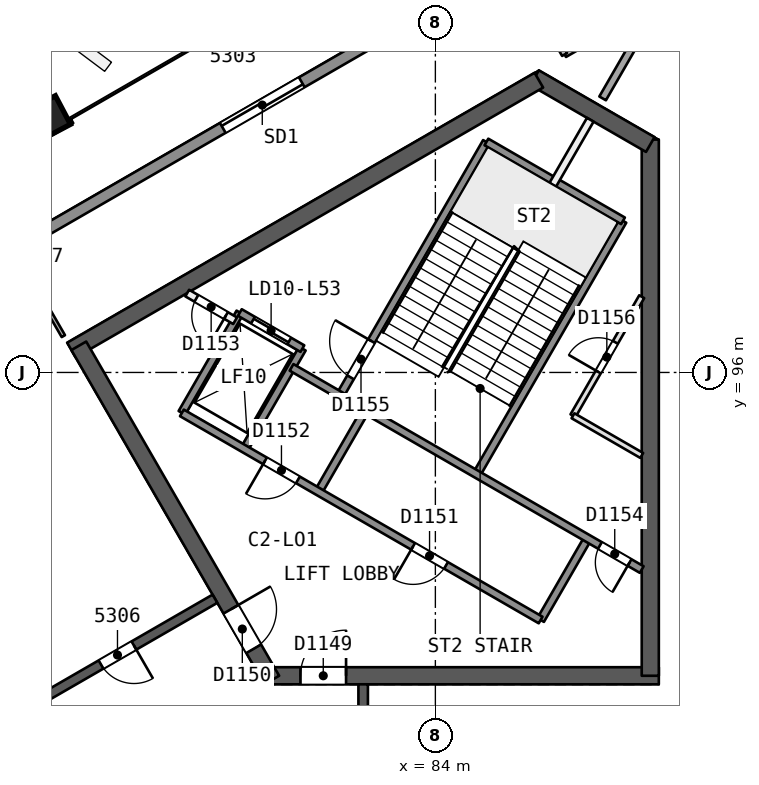
"""IFC4 building model, lengths in metres.
Left out: names, types, materials, properties, quantities, classifications, styles, units other than length and angle.
Written with IfcOpenShell. Run it as: python <this file> out.ifc"""

import sys

from ifc_helpers import new_model, si_unit, direction, frame, frame_2d, origin, origin_2d, place, context, subcontext, project, spatial, rectangle, extrude, element, fill, save


model = new_model("IFC4")
c1 = context("Model", 3, precision=1e-05, world=origin(), true_north=direction((0.0, 1.0)))
c2 = subcontext(c1, "Body", "Model", "MODEL_VIEW")
j1 = project(units=[si_unit("LENGTHUNIT", "METRE"), si_unit("PLANEANGLEUNIT", "RADIAN")], contexts=[c1])
p1 = place(None, origin())
s1 = spatial("IfcSite", under=j1, at=p1, CompositionType="ELEMENT")
p2 = place(p1, origin())
s2 = spatial("IfcBuilding", under=s1, at=p2, CompositionType="ELEMENT")
p3 = place(p2, frame((0.0, 0.0, 216.9)))
s3 = spatial("IfcBuildingStorey", under=s2, at=p3, CompositionType="ELEMENT", Elevation=216.9)
p4 = place(p3, frame((79.63, 88.019, 0.0), z_axis=(0.0, 0.0, 1.0), x_axis=(1.0, 0.0, 0.0)))
e1 = element("IfcWall", 1, at=p4, inside=s3, PredefinedType="SHEAR", context=c2, shape_type="SweptSolid", body=[
    extrude(rectangle(XDim=10.25, YDim=0.45, at=frame_2d((5.125, 0.0))), origin(), (0.0, 0.0, 1.0), 3.7),
])
p5 = place(p4, frame((0.82, 0.0, 0.0)))
e2 = element("IfcOpeningElement", 2, at=p5, cuts=e1, PredefinedType="OPENING", context=c2, shape_type="SweptSolid", body=[
    extrude(rectangle(XDim=1.2, YDim=2.1, at=frame_2d((0.6, 1.05))), frame((0.0, 0.235, 0.0), z_axis=(0.0, -1.0, 0.0), x_axis=(1.0, 0.0, 0.0)), (0.0, 0.0, 1.0), 0.471),
])
p6 = place(p3, frame((89.655, 88.019, 0.0), z_axis=(0.0, 0.0, 1.0), x_axis=(0.0, 1.0, 0.0)))
e3 = element("IfcWall", 3, at=p6, inside=s3, PredefinedType="SHEAR", context=c2, shape_type="SweptSolid", body=[
    extrude(rectangle(XDim=14.108, YDim=0.45, at=frame_2d((7.054, 0.0))), origin(), (0.0, 0.0, 1.0), 3.7),
])
p7 = place(p3, frame((89.655, 101.998, 0.0), z_axis=(0.0, 0.0, 1.0), x_axis=(-0.866042179588, 0.49997094233, 0.0)))
e4 = element("IfcWall", 4, at=p7, inside=s3, PredefinedType="SHEAR", context=c2, shape_type="SweptSolid", body=[
    extrude(rectangle(XDim=3.515, YDim=0.45, at=frame_2d((1.758, 0.0))), origin(), (0.0, 0.0, 1.0), 3.7),
])
p8 = place(p3, frame((86.723, 103.69, 0.0), z_axis=(0.0, 0.0, 1.0), x_axis=(-0.866022713978, -0.500004658852, 0.0)))
e5 = element("IfcWall", 5, at=p8, inside=s3, PredefinedType="SHEAR", context=c2, shape_type="SweptSolid", body=[
    extrude(rectangle(XDim=14.203, YDim=0.45, at=frame_2d((7.102, 0.0))), origin(), (0.0, 0.0, 1.0), 3.7),
])
p9 = place(p3, frame((74.617, 96.701, 0.0), z_axis=(0.0, 0.0, 1.0), x_axis=(0.499994385119, -0.866028645513, 0.0)))
e6 = element("IfcWall", 6, at=p9, inside=s3, PredefinedType="SHEAR", context=c2, shape_type="SweptSolid", body=[
    extrude(rectangle(XDim=10.155, YDim=0.45, at=frame_2d((5.077, 0.0))), origin(), (0.0, 0.0, 1.0), 3.7),
])
p10 = place(p9, frame((8.005, 0.0, 0.0)))
e7 = element("IfcOpeningElement", 7, at=p10, cuts=e6, PredefinedType="OPENING", context=c2, shape_type="SweptSolid", body=[
    extrude(rectangle(XDim=1.2, YDim=2.1, at=frame_2d((0.6, 1.05))), frame((0.0, 0.235, 0.0), z_axis=(0.0, -1.0, 0.0), x_axis=(1.0, 0.0, 0.0)), (0.0, 0.0, 1.0), 0.471),
])
p11 = place(p3, frame((82.1, 72.206, 0.0), z_axis=(0.0, 0.0, 1.0), x_axis=(0.0, 1.0, 0.0)))
e8 = element("IfcWall", 8, at=p11, inside=s3, PredefinedType="SHEAR", context=c2, shape_type="SweptSolid", body=[
    extrude(rectangle(XDim=15.588, YDim=0.25, at=frame_2d((7.794, 0.0))), origin(), (0.0, 0.0, 1.0), 3.3),
])
p12 = place(p11, frame((2.618, 0.0, 0.0)))
e9 = element("IfcOpeningElement", 9, at=p12, cuts=e8, PredefinedType="OPENING", context=c2, shape_type="SweptSolid", body=[
    extrude(rectangle(XDim=1.0, YDim=2.1, at=frame_2d((0.5, 1.05))), frame((0.0, 0.135, 0.0), z_axis=(0.0, -1.0, 0.0), x_axis=(1.0, 0.0, 0.0)), (0.0, 0.0, 1.0), 0.271),
])
p13 = place(p11, frame((7.974, 0.0, 0.0)))
e10 = element("IfcOpeningElement", 10, at=p13, cuts=e8, PredefinedType="OPENING", context=c2, shape_type="SweptSolid", body=[
    extrude(rectangle(XDim=1.2, YDim=2.4, at=frame_2d((0.6, 1.2))), frame((0.0, 0.135, 0.0), z_axis=(0.0, -1.0, 0.0), x_axis=(1.0, 0.0, 0.0)), (0.0, 0.0, 1.0), 0.271),
])
p14 = place(p11, frame((12.65, 0.0, 0.0)))
e11 = element("IfcOpeningElement", 11, at=p14, cuts=e8, PredefinedType="OPENING", context=c2, shape_type="SweptSolid", body=[
    extrude(rectangle(XDim=1.2, YDim=2.4, at=frame_2d((0.6, 1.2))), frame((0.0, 0.135, 0.0), z_axis=(0.0, -1.0, 0.0), x_axis=(1.0, 0.0, 0.0)), (0.0, 0.0, 1.0), 0.271),
])
p15 = place(p3, frame((78.2, 90.046, 0.0), z_axis=(0.0, 0.0, 1.0), x_axis=(-0.866026492143, -0.499998114903, 0.0)))
e12 = element("IfcWall", 12, at=p15, inside=s3, PredefinedType="SHEAR", context=c2, shape_type="SweptSolid", body=[
    extrude(rectangle(XDim=15.588, YDim=0.25, at=frame_2d((7.794, 0.0))), origin(), (0.0, 0.0, 1.0), 3.3),
])
p16 = place(p15, frame((2.462, 0.0, 0.0)))
e13 = element("IfcOpeningElement", 13, at=p16, cuts=e12, PredefinedType="OPENING", context=c2, shape_type="SweptSolid", body=[
    extrude(rectangle(XDim=1.0, YDim=2.1, at=frame_2d((0.5, 1.05))), frame((0.0, 0.135, 0.0), z_axis=(0.0, -1.0, 0.0), x_axis=(1.0, 0.0, 0.0)), (0.0, 0.0, 1.0), 0.271),
])
p17 = place(p15, frame((8.003, 0.0, 0.0)))
e14 = element("IfcOpeningElement", 14, at=p17, cuts=e12, PredefinedType="OPENING", context=c2, shape_type="SweptSolid", body=[
    extrude(rectangle(XDim=1.1, YDim=2.1, at=frame_2d((0.55, 1.05))), frame((0.0, 0.135, 0.0), z_axis=(0.0, -1.0, 0.0), x_axis=(1.0, 0.0, 0.0)), (0.0, 0.0, 1.0), 0.271),
])
p18 = place(p15, frame((11.971, 0.0, 0.0)))
e15 = element("IfcOpeningElement", 15, at=p18, cuts=e12, PredefinedType="OPENING", context=c2, shape_type="SweptSolid", body=[
    extrude(rectangle(XDim=1.0, YDim=2.1, at=frame_2d((0.5, 1.05))), frame((0.0, 0.135, 0.0), z_axis=(0.0, -1.0, 0.0), x_axis=(1.0, 0.0, 0.0)), (0.0, 0.0, 1.0), 0.271),
])
p19 = place(p3, frame((73.822, 102.734, 0.0), z_axis=(0.000857522362, -0.02282328747, 0.99973914708), x_axis=(0.866054521305, 0.499835732571, 0.010668016277)))
e16 = element("IfcColumn", 16, at=p19, inside=s3, PredefinedType="COLUMN", context=c2, shape_type="SweptSolid", body=[
    extrude(rectangle(XDim=0.85, YDim=0.85, at=origin_2d()), origin(), (0.0, 0.0, 1.0), 3.701),
])
p20 = place(p3, frame((90.394, 106.663, 0.0), z_axis=(0.0, 0.0, 1.0), x_axis=(-0.49999285859, -0.86602952684, 0.0)))
e17 = element("IfcWall", 17, at=p20, inside=s3, PredefinedType="PARTITIONING", context=c2, shape_type="SweptSolid", body=[
    extrude(rectangle(XDim=3.986, YDim=0.2, at=frame_2d((1.993, 0.0))), origin(), (0.0, 0.0, 1.0), 3.3),
])
p21 = place(p3, frame((74.21, 96.956, 0.0), z_axis=(0.0, 0.0, 1.0), x_axis=(-0.499953629774, 0.866052173992, 0.0)))
e18 = element("IfcWall", 18, at=p21, inside=s3, PredefinedType="PARTITIONING", context=c2, shape_type="SweptSolid", body=[
    extrude(rectangle(XDim=2.499, YDim=0.1, at=frame_2d((1.25, 0.0))), origin(), (0.0, 0.0, 1.0), 3.3),
])
p22 = place(p21, frame((0.799, 0.0, 0.0)))
e19 = element("IfcOpeningElement", 19, at=p22, cuts=e18, PredefinedType="OPENING", context=c2, shape_type="SweptSolid", body=[
    extrude(rectangle(XDim=0.9, YDim=2.1, at=frame_2d((0.45, 1.05))), frame((0.0, 0.061, 0.0), z_axis=(0.0, -1.0, 0.0), x_axis=(1.0, 0.0, 0.0)), (0.0, 0.0, 1.0), 0.121),
])
p23 = place(p3, frame((89.652, 105.666, 0.0), z_axis=(0.0, 0.0, 1.0), x_axis=(-0.866021400173, -0.500006934395, 0.0)))
e20 = element("IfcWall", 20, at=p23, inside=s3, PredefinedType="PARTITIONING", context=c2, shape_type="SweptSolid", body=[
    extrude(rectangle(XDim=2.6, YDim=0.15, at=frame_2d((1.3, 0.0))), origin(), (0.0, 0.0, 1.0), 3.3),
])
p24 = place(p3, frame((87.4, 104.366, 0.0), z_axis=(0.0, 0.0, 1.0), x_axis=(-0.500014634633, 0.86601695431, 0.0)))
e21 = element("IfcWall", 21, at=p24, inside=s3, PredefinedType="PARTITIONING", context=c2, shape_type="SweptSolid", body=[
    extrude(rectangle(XDim=2.676, YDim=0.15, at=frame_2d((1.338, 0.0))), origin(), (0.0, 0.0, 1.0), 3.3),
])
p25 = place(p24, frame((0.938, 0.0, 0.0)))
e22 = element("IfcOpeningElement", 22, at=p25, cuts=e21, PredefinedType="OPENING", context=c2, shape_type="SweptSolid", body=[
    extrude(rectangle(XDim=0.8, YDim=2.1, at=frame_2d((0.4, 1.05))), frame((0.0, 0.085, 0.0), z_axis=(0.0, -1.0, 0.0), x_axis=(1.0, 0.0, 0.0)), (0.0, 0.0, 1.0), 0.171),
])
p26 = place(p3, frame((44.063, 82.607, 0.0), z_axis=(0.0, 0.0, 1.0), x_axis=(0.866024402399, 0.500001734447, 0.0)))
e23 = element("IfcWall", 23, at=p26, inside=s3, PredefinedType="SOLIDWALL", context=c2, shape_type="SweptSolid", body=[
    extrude(rectangle(XDim=50.977, YDim=0.3, at=frame_2d((25.488, 0.0))), origin(), (0.0, 0.0, 1.0), 3.3),
])
p27 = place(p26, frame((24.444, 0.0, 0.0)))
e24 = element("IfcOpeningElement", 24, at=p27, cuts=e23, PredefinedType="OPENING", context=c2, shape_type="SweptSolid", body=[
    extrude(rectangle(XDim=2.4, YDim=2.4, at=frame_2d((1.2, 1.2))), frame((0.0, 0.161, 0.0), z_axis=(0.0, -1.0, 0.0), x_axis=(1.0, 0.0, 0.0)), (0.0, 0.0, 1.0), 0.321),
])
p28 = place(p26, frame((29.121, 0.0, 0.0)))
e25 = element("IfcOpeningElement", 25, at=p28, cuts=e23, PredefinedType="OPENING", context=c2, shape_type="SweptSolid", body=[
    extrude(rectangle(XDim=2.4, YDim=2.4, at=frame_2d((1.2, 1.2))), frame((0.0, 0.161, 0.0), z_axis=(0.0, -1.0, 0.0), x_axis=(1.0, 0.0, 0.0)), (0.0, 0.0, 1.0), 0.321),
])
p29 = place(p26, frame((39.656, 0.0, 0.0)))
e26 = element("IfcOpeningElement", 26, at=p29, cuts=e23, PredefinedType="OPENING", context=c2, shape_type="SweptSolid", body=[
    extrude(rectangle(XDim=2.4, YDim=2.4, at=frame_2d((1.2, 1.2))), frame((0.0, 0.161, 0.0), z_axis=(0.0, -1.0, 0.0), x_axis=(1.0, 0.0, 0.0)), (0.0, 0.0, 1.0), 0.321),
])
p30 = place(p26, frame((19.612, 0.0, 0.0)))
e27 = element("IfcOpeningElement", 27, at=p30, cuts=e23, PredefinedType="OPENING", context=c2, shape_type="SweptSolid", body=[
    extrude(rectangle(XDim=2.4, YDim=2.4, at=frame_2d((1.2, 1.2))), frame((0.0, 0.161, 0.0), z_axis=(0.0, -1.0, 0.0), x_axis=(1.0, 0.0, 0.0)), (0.0, 0.0, 1.0), 0.321),
])
p31 = place(p26, frame((8.885, 0.0, 0.0)))
e28 = element("IfcOpeningElement", 28, at=p31, cuts=e23, PredefinedType="OPENING", context=c2, shape_type="SweptSolid", body=[
    extrude(rectangle(XDim=2.4, YDim=2.4, at=frame_2d((1.2, 1.2))), frame((0.0, 0.161, 0.0), z_axis=(0.0, -1.0, 0.0), x_axis=(1.0, 0.0, 0.0)), (0.0, 0.0, 1.0), 0.321),
])
p32 = place(p3, frame((86.77, 89.486, 0.0), z_axis=(0.0, 0.0, 1.0), x_axis=(0.499961042966, 0.86604789447, 0.0)))
e29 = element("IfcWall", 29, at=p32, inside=s3, PredefinedType="SOLIDWALL", context=c2, shape_type="SweptSolid", body=[
    extrude(rectangle(XDim=2.48, YDim=0.2, at=frame_2d((1.24, 0.0))), origin(), (0.0, 0.0, 1.0), 3.3),
])
p33 = place(p3, frame((87.621, 94.86, 0.0), z_axis=(0.0, 0.0, 1.0), x_axis=(0.499993116331, 0.866029378036, 0.0)))
e30 = element("IfcWall", 30, at=p33, inside=s3, PredefinedType="PARTITIONING", context=c2, shape_type="SweptSolid", body=[
    extrude(rectangle(XDim=3.618, YDim=0.15, at=frame_2d((1.809, 0.0))), origin(), (0.0, 0.0, 1.0), 3.3),
])
p34 = place(p33, frame((1.332, 0.0, 0.0)))
e31 = element("IfcOpeningElement", 31, at=p34, cuts=e30, PredefinedType="OPENING", context=c2, shape_type="SweptSolid", body=[
    extrude(rectangle(XDim=0.9, YDim=2.1, at=frame_2d((0.45, 1.05))), frame((0.0, 0.085, 0.0), z_axis=(0.0, -1.0, 0.0), x_axis=(1.0, 0.0, 0.0)), (0.0, 0.0, 1.0), 0.171),
])
p35 = place(p3, frame((85.087, 93.321, 0.0), z_axis=(0.0, 0.0, 1.0), x_axis=(0.500019787375, 0.866013979237, 0.0)))
e32 = element("IfcWall", 32, at=p35, inside=s3, PredefinedType="SOLIDWALL", context=c2, shape_type="SweptSolid", body=[
    extrude(rectangle(XDim=7.7, YDim=0.2, at=frame_2d((3.85, 0.0))), origin(), (0.0, 0.0, 1.0), 3.3),
])
p36 = place(p3, frame((87.09, 100.94, 0.0), z_axis=(0.0, 0.0, 1.0), x_axis=(0.500011643316, 0.866018681408, 0.0)))
e33 = element("IfcWall", 33, at=p36, inside=s3, PredefinedType="PARTITIONING", context=c2, shape_type="SweptSolid", body=[
    extrude(rectangle(XDim=1.973, YDim=0.2, at=frame_2d((0.987, 0.0))), origin(), (0.0, 0.0, 1.0), 3.3),
])
p37 = place(p3, frame((80.924, 92.861, 0.0), z_axis=(0.0, 0.0, 1.0), x_axis=(0.499961042966, 0.86604789447, 0.0)))
e34 = element("IfcWall", 34, at=p37, inside=s3, PredefinedType="SOLIDWALL", context=c2, shape_type="SweptSolid", body=[
    extrude(rectangle(XDim=2.48, YDim=0.2, at=frame_2d((1.24, 0.0))), origin(), (0.0, 0.0, 1.0), 3.3),
])
p38 = place(p3, frame((81.493, 95.396, 0.0), z_axis=(0.0, 0.0, 1.0), x_axis=(0.500006057782, 0.866021906294, 0.0)))
e35 = element("IfcWall", 35, at=p38, inside=s3, PredefinedType="SOLIDWALL", context=c2, shape_type="SweptSolid", body=[
    extrude(rectangle(XDim=7.7, YDim=0.2, at=frame_2d((3.85, 0.0))), origin(), (0.0, 0.0, 1.0), 3.3),
])
p39 = place(p38, frame((0.55, 0.0, 0.0)))
e36 = element("IfcOpeningElement", 36, at=p39, cuts=e35, PredefinedType="OPENING", context=c2, shape_type="SweptSolid", body=[
    extrude(rectangle(XDim=1.1, YDim=2.1, at=frame_2d((0.55, 1.05))), frame((0.0, 0.11, 0.0), z_axis=(0.0, -1.0, 0.0), x_axis=(1.0, 0.0, 0.0)), (0.0, 0.0, 1.0), 0.221),
])
for number, where, z_axis, x_axis in (
    (37, (78.976, 93.986, 0.0), (0.0, 0.0, 1.0), (0.5, 0.866, 0.0)),
    (38, (77.33, 94.936, 0.0), (0.0, 0.0, 1.0), (0.5, 0.866, 0.0)),
):
    element("IfcWall", number, at=place(p3, frame(where, z_axis=z_axis, x_axis=x_axis)), inside=s3, PredefinedType="SOLIDWALL", context=c2, shape_type="SweptSolid", body=[
        extrude(rectangle(XDim=3.05, YDim=0.2, at=frame_2d((1.525, 0.0))), origin(), (0.0, 0.0, 1.0), 3.3),
    ])
p40 = place(p3, frame((86.77, 89.486, 0.0), z_axis=(0.0, 0.0, 1.0), x_axis=(-0.86601811187, 0.500012629753, 0.0)))
e39 = element("IfcWall", 39, at=p40, inside=s3, PredefinedType="SOLIDWALL", context=c2, shape_type="SweptSolid", body=[
    extrude(rectangle(XDim=10.9, YDim=0.2, at=frame_2d((5.45, 0.0))), origin(), (0.0, 0.0, 1.0), 3.3),
])
p41 = place(p40, frame((2.875, 0.0, 0.0)))
e40 = element("IfcOpeningElement", 40, at=p41, cuts=e39, PredefinedType="OPENING", context=c2, shape_type="SweptSolid", body=[
    extrude(rectangle(XDim=1.0, YDim=2.1, at=frame_2d((0.5, 1.05))), frame((0.0, 0.11, 0.0), z_axis=(0.0, -1.0, 0.0), x_axis=(1.0, 0.0, 0.0)), (0.0, 0.0, 1.0), 0.221),
])
p42 = place(p40, frame((7.375, 0.0, 0.0)))
e41 = element("IfcOpeningElement", 41, at=p42, cuts=e39, PredefinedType="OPENING", context=c2, shape_type="SweptSolid", body=[
    extrude(rectangle(XDim=1.0, YDim=2.1, at=frame_2d((0.5, 1.05))), frame((0.0, 0.11, 0.0), z_axis=(0.0, -1.0, 0.0), x_axis=(1.0, 0.0, 0.0)), (0.0, 0.0, 1.0), 0.221),
])
p43 = place(p3, frame((89.43, 90.814, 0.0), z_axis=(0.0, 0.0, 1.0), x_axis=(-0.866018983788, 0.500011119594, 0.0)))
e42 = element("IfcWall", 42, at=p43, inside=s3, PredefinedType="SOLIDWALL", context=c2, shape_type="SweptSolid", body=[
    extrude(rectangle(XDim=10.64, YDim=0.2, at=frame_2d((5.32, 0.0))), origin(), (0.0, 0.0, 1.0), 3.3),
])
p44 = place(p43, frame((0.37, 0.0, 0.0)))
e43 = element("IfcOpeningElement", 43, at=p44, cuts=e42, PredefinedType="OPENING", context=c2, shape_type="SweptSolid", body=[
    extrude(rectangle(XDim=0.9, YDim=2.1, at=frame_2d((0.45, 1.05))), frame((0.0, 0.11, 0.0), z_axis=(0.0, -1.0, 0.0), x_axis=(1.0, 0.0, 0.0)), (0.0, 0.0, 1.0), 0.221),
])
p45 = place(p3, frame((78.73, 97.361, 0.0), z_axis=(0.0, 0.0, 1.0), x_axis=(-0.866045896294, 0.499964504253, 0.0)))
e44 = element("IfcWall", 44, at=p45, inside=s3, PredefinedType="PARTITIONING", context=c2, shape_type="SweptSolid", body=[
    extrude(rectangle(XDim=1.455, YDim=0.2, at=frame_2d((0.728, 0.0))), origin(), (0.0, 0.0, 1.0), 3.3),
])
p46 = place(p45, frame((0.278, 0.0, 0.0)))
e45 = element("IfcOpeningElement", 45, at=p46, cuts=e44, PredefinedType="OPENING", context=c2, shape_type="SweptSolid", body=[
    extrude(rectangle(XDim=0.9, YDim=2.1, at=frame_2d((0.45, 1.05))), frame((0.0, 0.11, 0.0), z_axis=(0.0, -1.0, 0.0), x_axis=(1.0, 0.0, 0.0)), (0.0, 0.0, 1.0), 0.221),
])
p47 = place(p3, frame((80.5, 96.627, 0.0), z_axis=(0.0, 0.0, 1.0), x_axis=(-0.86601224135, 0.500022797313, 0.0)))
e46 = element("IfcWall", 46, at=p47, inside=s3, PredefinedType="SOLIDWALL", context=c2, shape_type="SweptSolid", body=[
    extrude(rectangle(XDim=1.9, YDim=0.2, at=frame_2d((0.95, 0.0))), origin(), (0.0, 0.0, 1.0), 3.3),
])
p48 = place(p47, frame((0.4, 0.0, 0.0)))
e47 = element("IfcOpeningElement", 47, at=p48, cuts=e46, PredefinedType="OPENING", context=c2, shape_type="SweptSolid", body=[
    extrude(rectangle(XDim=1.1, YDim=2.1, at=frame_2d((0.55, 1.05))), frame((0.0, 0.11, 0.0), z_axis=(0.0, -1.0, 0.0), x_axis=(1.0, 0.0, 0.0)), (0.0, 0.0, 1.0), 0.221),
])
p49 = place(p3, frame((89.43, 93.816, 0.0), z_axis=(0.0, 0.0, 1.0), x_axis=(-0.866004557827, 0.500036104519, 0.0)))
e48 = element("IfcWall", 48, at=p49, inside=s3, PredefinedType="PARTITIONING", context=c2, shape_type="SweptSolid", body=[
    extrude(rectangle(XDim=2.089, YDim=0.15, at=frame_2d((1.044, 0.0))), origin(), (0.0, 0.0, 1.0), 3.3),
])
p50 = place(p3, frame((88.937, 99.99, 0.0), z_axis=(0.0, 0.0, 1.0), x_axis=(-0.866004344652, 0.500036473714, 0.0)))
e49 = element("IfcWall", 49, at=p50, inside=s3, PredefinedType="SOLIDWALL", context=c2, shape_type="SweptSolid", body=[
    extrude(rectangle(XDim=4.15, YDim=0.2, at=frame_2d((2.075, 0.0))), origin(), (0.0, 0.0, 1.0), 3.3),
])
p51 = place(p16, origin())
e50 = element("IfcDoor", 50, at=p51, inside=s3, OperationType="SINGLE_SWING_LEFT", PredefinedType="NOTDEFINED", context=c2, shape_type="SweptSolid", body=[
    extrude(rectangle(XDim=1.0, YDim=2.1, at=frame_2d((0.5, 1.05))), frame((0.0, 0.025, 0.0), z_axis=(0.0, -1.0, 0.0), x_axis=(1.0, 0.0, 0.0)), (0.0, 0.0, 1.0), 0.05),
])
fill(e13, e50)
p52 = place(p29, origin())
e51 = element("IfcDoor", 51, at=p52, inside=s3, OperationType="SLIDING_TO_LEFT", PredefinedType="NOTDEFINED", context=c2, shape_type="SweptSolid", body=[
    extrude(rectangle(XDim=2.4, YDim=2.4, at=frame_2d((1.2, 1.2))), frame((0.0, 0.025, 0.0), z_axis=(0.0, -1.0, 0.0), x_axis=(1.0, 0.0, 0.0)), (0.0, 0.0, 1.0), 0.05),
])
fill(e26, e51)
p53 = place(p5, origin())
e52 = element("IfcDoor", 52, at=p53, inside=s3, OperationType="SINGLE_SWING_RIGHT", PredefinedType="NOTDEFINED", context=c2, shape_type="SweptSolid", body=[
    extrude(rectangle(XDim=1.2, YDim=2.1, at=frame_2d((0.6, 1.05))), frame((0.0, 0.025, 0.0), z_axis=(0.0, -1.0, 0.0), x_axis=(1.0, 0.0, 0.0)), (0.0, 0.0, 1.0), 0.05),
])
fill(e2, e52)
p54 = place(p10, origin())
e53 = element("IfcDoor", 53, at=p54, inside=s3, OperationType="SINGLE_SWING_LEFT", PredefinedType="NOTDEFINED", context=c2, shape_type="SweptSolid", body=[
    extrude(rectangle(XDim=1.2, YDim=2.1, at=frame_2d((0.6, 1.05))), frame((0.0, 0.025, 0.0), z_axis=(0.0, -1.0, 0.0), x_axis=(1.0, 0.0, 0.0)), (0.0, 0.0, 1.0), 0.05),
])
fill(e7, e53)
p55 = place(p48, origin())
e54 = element("IfcDoor", 54, at=p55, inside=s3, OperationType="SLIDING_TO_RIGHT", PredefinedType="NOTDEFINED", context=c2, shape_type="SweptSolid", body=[
    extrude(rectangle(XDim=1.1, YDim=2.1, at=frame_2d((0.55, 1.05))), frame((0.0, 0.025, 0.0), z_axis=(0.0, -1.0, 0.0), x_axis=(1.0, 0.0, 0.0)), (0.0, 0.0, 1.0), 0.05),
])
fill(e47, e54)
p56 = place(p41, origin())
e55 = element("IfcDoor", 55, at=p56, inside=s3, OperationType="SINGLE_SWING_RIGHT", PredefinedType="NOTDEFINED", context=c2, shape_type="SweptSolid", body=[
    extrude(rectangle(XDim=1.0, YDim=2.1, at=frame_2d((0.5, 1.05))), frame((0.0, 0.025, 0.0), z_axis=(0.0, -1.0, 0.0), x_axis=(1.0, 0.0, 0.0)), (0.0, 0.0, 1.0), 0.05),
])
fill(e40, e55)
p57 = place(p42, origin())
e56 = element("IfcDoor", 56, at=p57, inside=s3, OperationType="SINGLE_SWING_RIGHT", PredefinedType="NOTDEFINED", context=c2, shape_type="SweptSolid", body=[
    extrude(rectangle(XDim=1.0, YDim=2.1, at=frame_2d((0.5, 1.05))), frame((0.0, 0.025, 0.0), z_axis=(0.0, -1.0, 0.0), x_axis=(1.0, 0.0, 0.0)), (0.0, 0.0, 1.0), 0.05),
])
fill(e41, e56)
p58 = place(p46, origin())
e57 = element("IfcDoor", 57, at=p58, inside=s3, OperationType="SINGLE_SWING_LEFT", PredefinedType="NOTDEFINED", context=c2, shape_type="SweptSolid", body=[
    extrude(rectangle(XDim=0.9, YDim=2.1, at=frame_2d((0.45, 1.05))), frame((0.0, 0.025, 0.0), z_axis=(0.0, -1.0, 0.0), x_axis=(1.0, 0.0, 0.0)), (0.0, 0.0, 1.0), 0.05),
])
fill(e45, e57)
p59 = place(p44, origin())
e58 = element("IfcDoor", 58, at=p59, inside=s3, OperationType="SINGLE_SWING_LEFT", PredefinedType="NOTDEFINED", context=c2, shape_type="SweptSolid", body=[
    extrude(rectangle(XDim=0.9, YDim=2.1, at=frame_2d((0.45, 1.05))), frame((0.0, 0.025, 0.0), z_axis=(0.0, -1.0, 0.0), x_axis=(1.0, 0.0, 0.0)), (0.0, 0.0, 1.0), 0.05),
])
fill(e43, e58)
p60 = place(p39, origin())
e59 = element("IfcDoor", 59, at=p60, inside=s3, OperationType="SINGLE_SWING_RIGHT", PredefinedType="NOTDEFINED", context=c2, shape_type="SweptSolid", body=[
    extrude(rectangle(XDim=1.1, YDim=2.1, at=frame_2d((0.55, 1.05))), frame((0.0, 0.025, 0.0), z_axis=(0.0, -1.0, 0.0), x_axis=(1.0, 0.0, 0.0)), (0.0, 0.0, 1.0), 0.05),
])
fill(e36, e59)
p61 = place(p34, origin())
e60 = element("IfcDoor", 60, at=p61, inside=s3, OperationType="SINGLE_SWING_LEFT", PredefinedType="NOTDEFINED", context=c2, shape_type="SweptSolid", body=[
    extrude(rectangle(XDim=0.9, YDim=2.1, at=frame_2d((0.45, 1.05))), frame((0.0, 0.025, 0.0), z_axis=(0.0, -1.0, 0.0), x_axis=(1.0, 0.0, 0.0)), (0.0, 0.0, 1.0), 0.05),
])
fill(e31, e60)
save(model, sys.argv[1])
